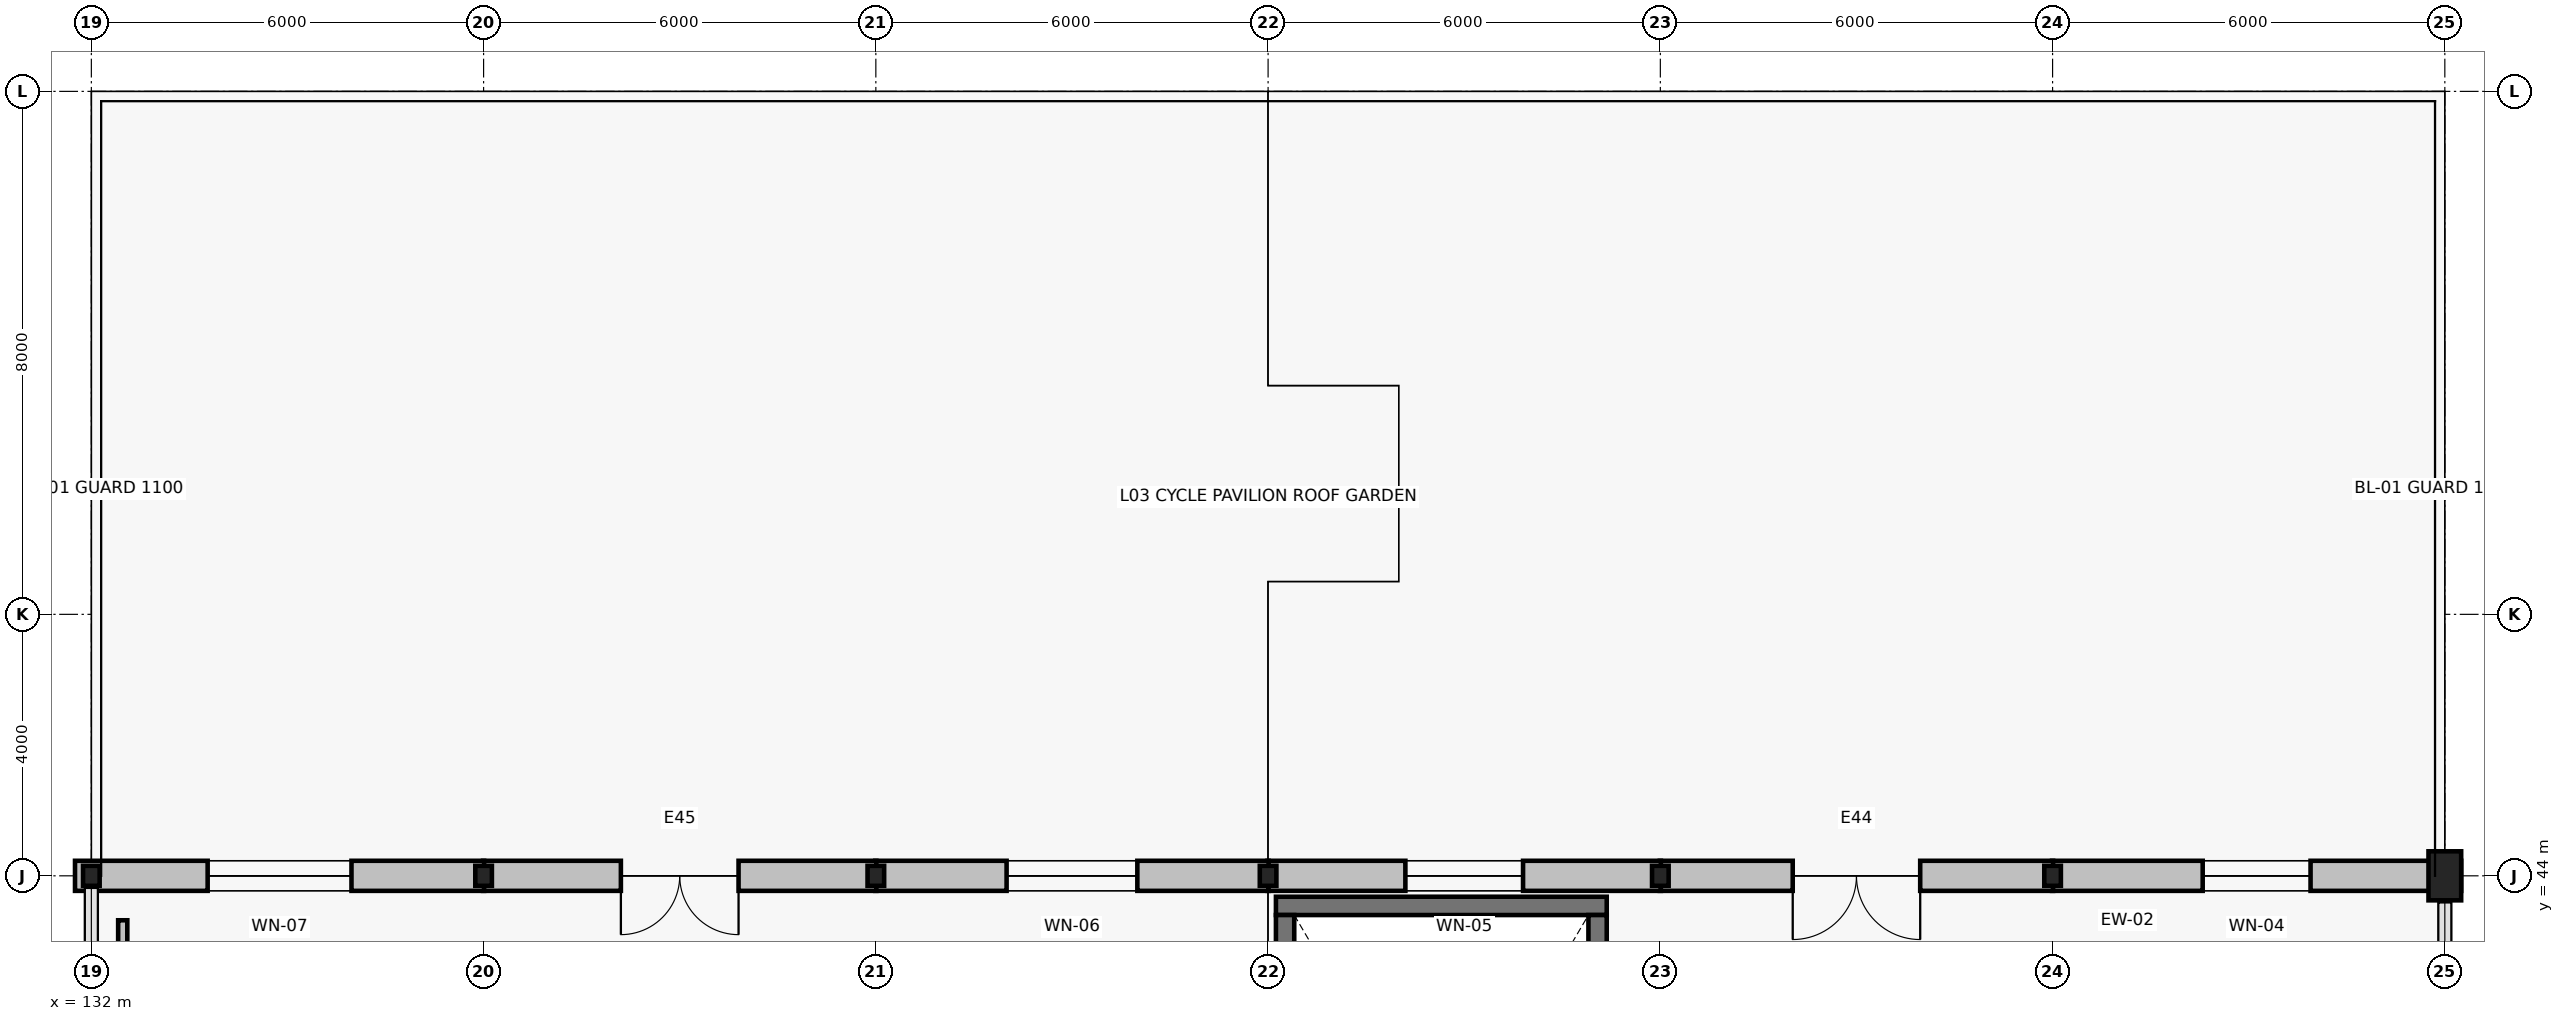
"""IFC4 building model, lengths in metres.
Left out: names, types, materials, properties, quantities, classifications, styles, units other than length and angle.
Written with IfcOpenShell. Run it as: python <this file> out.ifc"""

import sys

from ifc_helpers import new_model, si_unit, direction, frame, frame_2d, origin, origin_2d, place, context, subcontext, project, spatial, rectangle, i_section, extrude, element, fill, save


model = new_model("IFC4")
c1 = context("Model", 3, precision=1e-05, world=origin(), true_north=direction((0.0, 1.0)))
c2 = subcontext(c1, "Body", "Model", "MODEL_VIEW")
j1 = project(units=[si_unit("LENGTHUNIT", "METRE"), si_unit("PLANEANGLEUNIT", "RADIAN")], contexts=[c1])
p1 = place(None, origin())
s1 = spatial("IfcSite", under=j1, at=p1, CompositionType="ELEMENT")
p2 = place(p1, origin())
s2 = spatial("IfcBuilding", under=s1, at=p2, CompositionType="ELEMENT")
p3 = place(p2, frame((0.0, 0.0, 11.4)))
s3 = spatial("IfcBuildingStorey", under=s2, at=p3, CompositionType="ELEMENT", Elevation=11.4)
for number, where, z_axis, x_axis in (
    (1, (132.0, 44.0, 0.0), (0.0, 0.0, 1.0), (1.0, 0.0, 0.0)),
    (2, (138.0, 44.0, 0.0), (0.0, 0.0, 1.0), (1.0, 0.0, 0.0)),
    (3, (144.0, 44.0, 0.0), (0.0, 0.0, 1.0), (1.0, 0.0, 0.0)),
    (4, (150.0, 44.0, 0.0), (0.0, 0.0, 1.0), (1.0, 0.0, 0.0)),
    (5, (156.0, 44.0, 0.0), (0.0, 0.0, 1.0), (1.0, 0.0, 0.0)),
    (6, (162.0, 44.0, 0.0), (0.0, 0.0, 1.0), (1.0, 0.0, 0.0)),
):
    element("IfcColumn", number, at=place(p3, frame(where, z_axis=z_axis, x_axis=x_axis)), inside=s3, PredefinedType="COLUMN", context=c2, shape_type="SweptSolid", body=[
        extrude(i_section(OverallWidth=0.254, OverallDepth=0.306, WebThickness=0.009, FlangeThickness=0.015, FilletRadius=0.013, at=origin_2d()), origin(), (0.0, 0.0, 1.0), 4.0),
    ])
p4 = place(p3, frame((168.0, 44.0, 0.0), z_axis=(0.0, 0.0, 1.0), x_axis=(1.0, 0.0, 0.0)))
e7 = element("IfcColumn", 7, at=p4, inside=s3, PredefinedType="PILASTER", context=c2, shape_type="SweptSolid", body=[
    extrude(rectangle(XDim=0.5, YDim=0.75, at=origin_2d()), origin(), (0.0, 0.0, 1.0), 4.0),
])
p5 = place(p3, frame((168.25, 44.0, 0.0), z_axis=(0.0, 0.0, 1.0), x_axis=(-1.0, 0.0, 0.0)))
e8 = element("IfcWall", 8, at=p5, inside=s3, PredefinedType="SOLIDWALL", context=c2, shape_type="SweptSolid", body=[
    extrude(rectangle(XDim=6.258, YDim=0.46, at=frame_2d((3.129, 0.0))), origin(), (0.0, 0.0, 1.0), 3.111),
])
p6 = place(p5, frame((2.304, 0.0, 0.9)))
e9 = element("IfcOpeningElement", 9, at=p6, cuts=e8, PredefinedType="OPENING", context=c2, shape_type="SweptSolid", body=[
    extrude(rectangle(XDim=1.65, YDim=1.8, at=frame_2d((0.825, 0.9))), frame((0.0, 0.245, 0.0), z_axis=(0.0, -1.0, 0.0), x_axis=(1.0, 0.0, 0.0)), (0.0, 0.0, 1.0), 0.49),
])
p7 = place(p3, frame((162.008, 44.0, 0.0), z_axis=(0.0, 0.0, 1.0), x_axis=(-1.0, 0.0, 0.0)))
e10 = element("IfcWall", 10, at=p7, inside=s3, PredefinedType="SOLIDWALL", context=c2, shape_type="SweptSolid", body=[
    extrude(rectangle(XDim=6.016, YDim=0.46, at=frame_2d((3.008, 0.0))), origin(), (0.0, 0.0, 1.0), 3.111),
])
p8 = place(p7, frame((2.033, 0.0, 0.0)))
e11 = element("IfcOpeningElement", 11, at=p8, cuts=e10, PredefinedType="OPENING", context=c2, shape_type="SweptSolid", body=[
    extrude(rectangle(XDim=1.95, YDim=2.3, at=frame_2d((0.975, 1.15))), frame((0.0, 0.245, 0.0), z_axis=(0.0, -1.0, 0.0), x_axis=(1.0, 0.0, 0.0)), (0.0, 0.0, 1.0), 0.49),
])
p9 = place(p3, frame((156.008, 44.0, 0.0), z_axis=(0.0, 0.0, 1.0), x_axis=(-1.0, 0.0, 0.0)))
e12 = element("IfcWall", 12, at=p9, inside=s3, PredefinedType="SOLIDWALL", context=c2, shape_type="SweptSolid", body=[
    extrude(rectangle(XDim=6.016, YDim=0.46, at=frame_2d((3.008, 0.0))), origin(), (0.0, 0.0, 1.0), 3.111),
])
p10 = place(p9, frame((2.108, 0.0, 0.9)))
e13 = element("IfcOpeningElement", 13, at=p10, cuts=e12, PredefinedType="OPENING", context=c2, shape_type="SweptSolid", body=[
    extrude(rectangle(XDim=1.8, YDim=1.8, at=frame_2d((0.9, 0.9))), frame((0.0, 0.245, 0.0), z_axis=(0.0, -1.0, 0.0), x_axis=(1.0, 0.0, 0.0)), (0.0, 0.0, 1.0), 0.49),
])
p11 = place(p3, frame((150.008, 44.0, 0.0), z_axis=(0.0, 0.0, 1.0), x_axis=(-1.0, 0.0, 0.0)))
e14 = element("IfcWall", 14, at=p11, inside=s3, PredefinedType="SOLIDWALL", context=c2, shape_type="SweptSolid", body=[
    extrude(rectangle(XDim=6.016, YDim=0.46, at=frame_2d((3.008, 0.0))), origin(), (0.0, 0.0, 1.0), 3.187),
])
p12 = place(p11, frame((2.008, 0.0, 0.9)))
e15 = element("IfcOpeningElement", 15, at=p12, cuts=e14, PredefinedType="OPENING", context=c2, shape_type="SweptSolid", body=[
    extrude(rectangle(XDim=2.0, YDim=1.8, at=frame_2d((1.0, 0.9))), frame((0.0, 0.245, 0.0), z_axis=(0.0, -1.0, 0.0), x_axis=(1.0, 0.0, 0.0)), (0.0, 0.0, 1.0), 0.49),
])
p13 = place(p3, frame((144.008, 44.0, 0.0), z_axis=(0.0, 0.0, 1.0), x_axis=(-1.0, 0.0, 0.0)))
e16 = element("IfcWall", 16, at=p13, inside=s3, PredefinedType="SOLIDWALL", context=c2, shape_type="SweptSolid", body=[
    extrude(rectangle(XDim=6.016, YDim=0.46, at=frame_2d((3.008, 0.0))), origin(), (0.0, 0.0, 1.0), 3.187),
])
p14 = place(p13, frame((2.108, 0.0, 0.0)))
e17 = element("IfcOpeningElement", 17, at=p14, cuts=e16, PredefinedType="OPENING", context=c2, shape_type="SweptSolid", body=[
    extrude(rectangle(XDim=1.8, YDim=2.25, at=frame_2d((0.9, 1.125))), frame((0.0, 0.245, 0.0), z_axis=(0.0, -1.0, 0.0), x_axis=(1.0, 0.0, 0.0)), (0.0, 0.0, 1.0), 0.49),
])
p15 = place(p3, frame((138.008, 44.0, 0.0), z_axis=(0.0, 0.0, 1.0), x_axis=(-1.0, 0.0, 0.0)))
e18 = element("IfcWall", 18, at=p15, inside=s3, PredefinedType="SOLIDWALL", context=c2, shape_type="SweptSolid", body=[
    extrude(rectangle(XDim=6.258, YDim=0.46, at=frame_2d((3.129, 0.0))), origin(), (0.0, 0.0, 1.0), 3.187),
])
p16 = place(p15, frame((2.029, 0.0, 0.9)))
e19 = element("IfcOpeningElement", 19, at=p16, cuts=e18, PredefinedType="OPENING", context=c2, shape_type="SweptSolid", body=[
    extrude(rectangle(XDim=2.2, YDim=1.8, at=frame_2d((1.1, 0.9))), frame((0.0, 0.245, 0.0), z_axis=(0.0, -1.0, 0.0), x_axis=(1.0, 0.0, 0.0)), (0.0, 0.0, 1.0), 0.49),
])
p17 = place(p3, frame((155.18, 43.54, 0.0), z_axis=(0.0, 0.0, 1.0), x_axis=(-1.0, 0.0, 0.0)))
e20 = element("IfcWall", 20, at=p17, inside=s3, PredefinedType="SHEAR", context=c2, shape_type="SweptSolid", body=[
    extrude(rectangle(XDim=5.06, YDim=0.28, at=frame_2d((2.53, 0.0))), origin(), (0.0, 0.0, 1.0), 3.76),
])
for number, where, z_axis, x_axis in (
    (21, (150.26, 43.4, 0.0), (0.0, 0.0, 1.0), (0.0, -1.0, 0.0)),
    (22, (155.04, 33.6, 0.0), (0.0, 0.0, 1.0), (0.0, 1.0, 0.0)),
):
    element("IfcWall", number, at=place(p3, frame(where, z_axis=z_axis, x_axis=x_axis)), inside=s3, PredefinedType="SHEAR", context=c2, shape_type="SweptSolid", body=[
        extrude(rectangle(XDim=9.8, YDim=0.28, at=frame_2d((4.9, 0.0))), origin(), (0.0, 0.0, 1.0), 3.76),
    ])
p18 = place(p3, frame((132.48, 28.41, 0.0), z_axis=(0.0, 0.0, 1.0), x_axis=(0.0, 1.0, 0.0)))
e23 = element("IfcWall", 23, at=p18, inside=s3, PredefinedType="PARTITIONING", context=c2, shape_type="SweptSolid", body=[
    extrude(rectangle(XDim=14.91, YDim=0.14, at=frame_2d((7.455, 0.0))), origin(), (0.0, 0.0, 1.0), 3.187),
])
p19 = place(p18, frame((6.855, 0.0, 0.0)))
e24 = element("IfcOpeningElement", 24, at=p19, cuts=e23, PredefinedType="OPENING", context=c2, shape_type="SweptSolid", body=[
    extrude(rectangle(XDim=1.2, YDim=2.15, at=frame_2d((0.6, 1.075))), frame((0.0, 0.085, 0.0), z_axis=(0.0, -1.0, 0.0), x_axis=(1.0, 0.0, 0.0)), (0.0, 0.0, 1.0), 0.17),
])
p20 = place(p6, origin())
e25 = element("IfcWindow", 25, at=p20, inside=s3, PartitioningType="SINGLE_PANEL", PredefinedType="WINDOW", context=c2, shape_type="SweptSolid", body=[
    extrude(rectangle(XDim=1.65, YDim=1.8, at=frame_2d((0.825, 0.9))), frame((0.0, 0.03, 0.0), z_axis=(0.0, -1.0, 0.0), x_axis=(1.0, 0.0, 0.0)), (0.0, 0.0, 1.0), 0.06),
])
fill(e9, e25)
p21 = place(p8, origin())
e26 = element("IfcDoor", 26, at=p21, inside=s3, OperationType="DOUBLE_DOOR_SINGLE_SWING", PredefinedType="DOOR", context=c2, shape_type="SweptSolid", body=[
    extrude(rectangle(XDim=1.95, YDim=2.3, at=frame_2d((0.975, 1.15))), frame((0.0, 0.025, 0.0), z_axis=(0.0, -1.0, 0.0), x_axis=(1.0, 0.0, 0.0)), (0.0, 0.0, 1.0), 0.05),
])
fill(e11, e26)
p22 = place(p10, origin())
e27 = element("IfcWindow", 27, at=p22, inside=s3, PartitioningType="SINGLE_PANEL", PredefinedType="WINDOW", context=c2, shape_type="SweptSolid", body=[
    extrude(rectangle(XDim=1.8, YDim=1.8, at=frame_2d((0.9, 0.9))), frame((0.0, 0.03, 0.0), z_axis=(0.0, -1.0, 0.0), x_axis=(1.0, 0.0, 0.0)), (0.0, 0.0, 1.0), 0.06),
])
fill(e13, e27)
p23 = place(p12, origin())
e28 = element("IfcWindow", 28, at=p23, inside=s3, PartitioningType="SINGLE_PANEL", PredefinedType="WINDOW", context=c2, shape_type="SweptSolid", body=[
    extrude(rectangle(XDim=2.0, YDim=1.8, at=frame_2d((1.0, 0.9))), frame((0.0, 0.03, 0.0), z_axis=(0.0, -1.0, 0.0), x_axis=(1.0, 0.0, 0.0)), (0.0, 0.0, 1.0), 0.06),
])
fill(e15, e28)
p24 = place(p14, origin())
e29 = element("IfcDoor", 29, at=p24, inside=s3, OperationType="DOUBLE_DOOR_SINGLE_SWING", PredefinedType="DOOR", context=c2, shape_type="SweptSolid", body=[
    extrude(rectangle(XDim=1.8, YDim=2.25, at=frame_2d((0.9, 1.125))), frame((0.0, 0.025, 0.0), z_axis=(0.0, -1.0, 0.0), x_axis=(1.0, 0.0, 0.0)), (0.0, 0.0, 1.0), 0.05),
])
fill(e17, e29)
p25 = place(p16, origin())
e30 = element("IfcWindow", 30, at=p25, inside=s3, PartitioningType="SINGLE_PANEL", PredefinedType="WINDOW", context=c2, shape_type="SweptSolid", body=[
    extrude(rectangle(XDim=2.2, YDim=1.8, at=frame_2d((1.1, 0.9))), frame((0.0, 0.03, 0.0), z_axis=(0.0, -1.0, 0.0), x_axis=(1.0, 0.0, 0.0)), (0.0, 0.0, 1.0), 0.06),
])
fill(e19, e30)
save(model, sys.argv[1])
